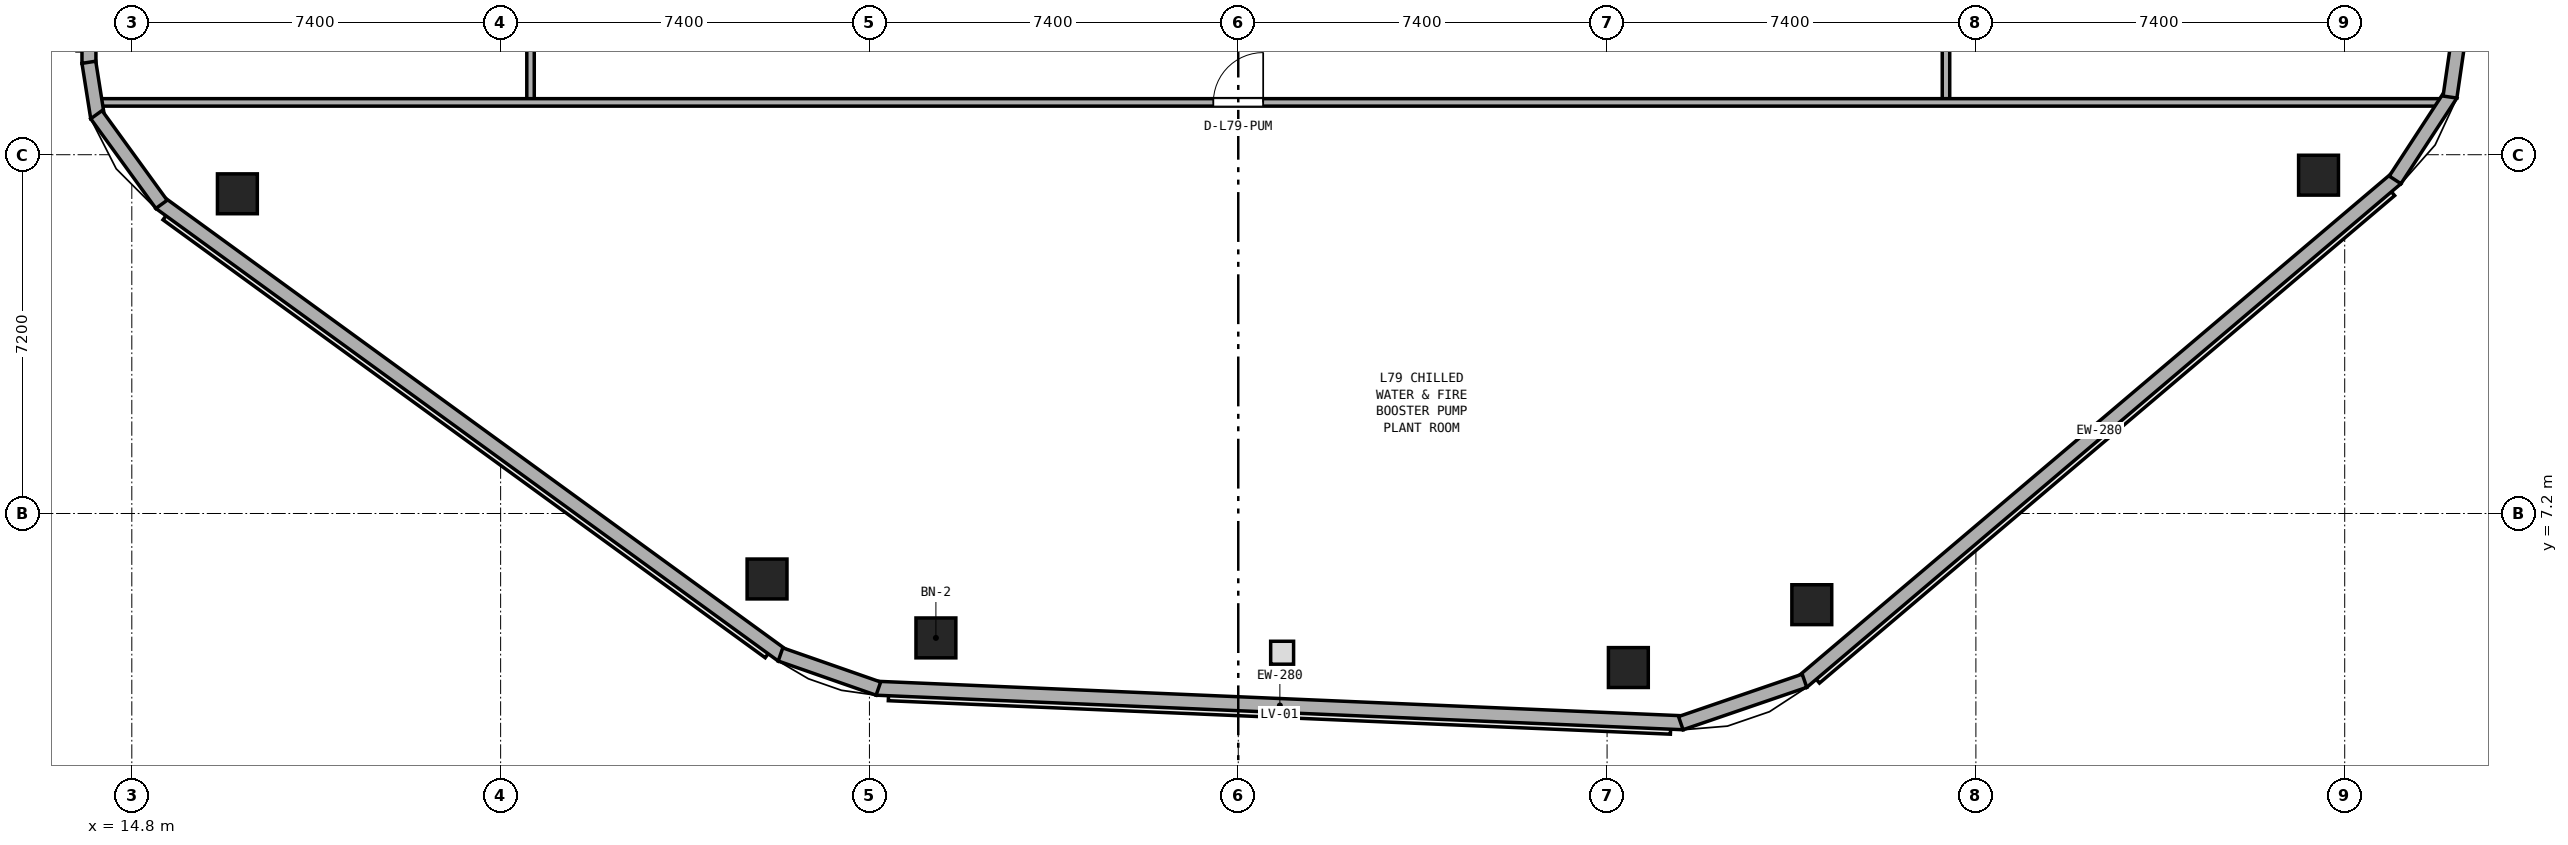
"""IFC4 building model, lengths in metres.
Left out: names, types, materials, properties, quantities, classifications, styles, units other than length and angle.
Written with IfcOpenShell. Run it as: python <this file> out.ifc"""

import sys

from ifc_helpers import new_model, si_unit, direction, frame, frame_2d, origin, origin_2d, place, context, subcontext, project, spatial, rectangle, extrude, element, fill, save


model = new_model("IFC4")
c1 = context("Model", 3, precision=1e-05, world=origin(), true_north=direction((0.0, 1.0)))
c2 = subcontext(c1, "Body", "Model", "MODEL_VIEW")
j1 = project(units=[si_unit("LENGTHUNIT", "METRE"), si_unit("PLANEANGLEUNIT", "RADIAN")], contexts=[c1])
p1 = place(None, origin())
s1 = spatial("IfcSite", under=j1, at=p1, CompositionType="ELEMENT")
p2 = place(p1, origin())
s2 = spatial("IfcBuilding", under=s1, at=p2, CompositionType="ELEMENT")
p3 = place(p2, frame((0.0, 0.0, 308.6)))
s3 = spatial("IfcBuildingStorey", under=s2, at=p3, CompositionType="ELEMENT", Elevation=308.6)
for number, where, z_axis, x_axis in (
    (1, (30.934, 4.703, 0.0), (0.0, 0.0, 1.0), (1.0, 0.0, 0.0)),
    (2, (44.827, 4.108, 0.0), (0.0, 0.0, 1.0), (1.0, 0.0, 0.0)),
    (3, (48.508, 5.37, 0.0), (0.0, 0.0, 1.0), (1.0, 0.0, 0.0)),
    (4, (58.675, 13.989, 0.0), (0.0, 0.0, 1.0), (1.0, 0.0, 0.0)),
    (5, (16.918, 13.616, 0.0), (0.0, 0.0, 1.0), (1.0, 0.0, 0.0)),
    (6, (27.545, 5.886, 0.0), (0.0, 0.0, 1.0), (1.0, 0.0, 0.0)),
):
    element("IfcColumn", number, at=place(p3, frame(where, z_axis=z_axis, x_axis=x_axis)), inside=s3, PredefinedType="COLUMN", context=c2, shape_type="SweptSolid", body=[
        extrude(rectangle(XDim=0.8, YDim=0.8, at=origin_2d()), origin(), (0.0, 0.0, 1.0), 4.8),
    ])
p4 = place(p3, frame((51.2, 15.45, 0.0), z_axis=(0.0, 0.0, 1.0), x_axis=(0.0, 1.0, 0.0)))
e7 = element("IfcWall", 7, at=p4, inside=s3, PredefinedType="PARTITIONING", context=c2, shape_type="SweptSolid", body=[
    extrude(rectangle(XDim=19.5, YDim=0.15, at=frame_2d((9.75, 0.0))), origin(), (0.0, 0.0, 1.0), 4.52),
])
p5 = place(p4, frame((9.15, 0.0, 0.0)))
e8 = element("IfcOpeningElement", 8, at=p5, cuts=e7, PredefinedType="OPENING", context=c2, shape_type="SweptSolid", body=[
    extrude(rectangle(XDim=1.2, YDim=2.15, at=frame_2d((0.6, 1.075))), frame((0.0, 0.085, 0.0), z_axis=(0.0, -1.0, 0.0), x_axis=(1.0, 0.0, 0.0)), (0.0, 0.0, 1.0), 0.17),
])
p6 = place(p3, frame((22.8, 15.45, 0.0), z_axis=(0.0, 0.0, 1.0), x_axis=(0.0, 1.0, 0.0)))
e9 = element("IfcWall", 9, at=p6, inside=s3, PredefinedType="PARTITIONING", context=c2, shape_type="SweptSolid", body=[
    extrude(rectangle(XDim=19.5, YDim=0.15, at=frame_2d((9.75, 0.0))), origin(), (0.0, 0.0, 1.0), 4.52),
])
p7 = place(p6, frame((9.25, 0.0, 0.0)))
e10 = element("IfcOpeningElement", 10, at=p7, cuts=e9, PredefinedType="OPENING", context=c2, shape_type="SweptSolid", body=[
    extrude(rectangle(XDim=1.0, YDim=2.04, at=frame_2d((0.5, 1.02))), frame((0.0, 0.085, 0.0), z_axis=(0.0, -1.0, 0.0), x_axis=(1.0, 0.0, 0.0)), (0.0, 0.0, 1.0), 0.17),
])
p8 = place(p3, frame((14.129, 15.45, 0.0), z_axis=(0.0, 0.0, 1.0), x_axis=(1.0, 0.0, 0.0)))
e11 = element("IfcWall", 11, at=p8, inside=s3, PredefinedType="PARTITIONING", context=c2, shape_type="SweptSolid", body=[
    extrude(rectangle(XDim=47.076, YDim=0.15, at=frame_2d((23.538, 0.0))), origin(), (0.0, 0.0, 1.0), 2.12),
])
p9 = place(p8, frame((22.371, 0.0, 0.0)))
e12 = element("IfcOpeningElement", 12, at=p9, cuts=e11, PredefinedType="OPENING", context=c2, shape_type="SweptSolid", body=[
    extrude(rectangle(XDim=1.0, YDim=2.04, at=frame_2d((0.5, 1.02))), frame((0.0, 0.085, 0.0), z_axis=(0.0, -1.0, 0.0), x_axis=(1.0, 0.0, 0.0)), (0.0, 0.0, 1.0), 0.17),
])
p10 = place(p3, frame((29.739, 3.693, 0.0), z_axis=(0.0, 0.0, 1.0), x_axis=(0.99908501205, -0.04276843108, 0.0)))
e13 = element("IfcWall", 13, at=p10, inside=s3, PredefinedType="STANDARD", context=c2, shape_type="SweptSolid", body=[
    extrude(rectangle(XDim=16.206, YDim=0.28, at=frame_2d((8.103, 0.0))), origin(), (0.0, 0.0, 1.0), 4.52),
])
p11 = place(p3, frame((48.316, 3.818, 0.0), z_axis=(0.0, 0.0, 1.0), x_axis=(0.762789291165, 0.646647119598, 0.0)))
e14 = element("IfcWall", 14, at=p11, inside=s3, PredefinedType="STANDARD", context=c2, shape_type="SweptSolid", body=[
    extrude(rectangle(XDim=15.629, YDim=0.28, at=frame_2d((7.814, 0.0))), origin(), (0.0, 0.0, 1.0), 4.52),
])
p12 = place(p3, frame((13.94, 33.386, 0.0), z_axis=(0.0, 0.0, 1.0), x_axis=(0.0, -1.0, 0.0)))
e15 = element("IfcWall", 15, at=p12, inside=s3, PredefinedType="STANDARD", context=c2, shape_type="SweptSolid", body=[
    extrude(rectangle(XDim=17.153, YDim=0.28, at=frame_2d((8.576, 0.0))), origin(), (0.0, 0.0, 1.0), 4.52),
])
p13 = place(p3, frame((15.365, 13.435, 0.0), z_axis=(0.0, 0.0, 1.0), x_axis=(0.8087025807, -0.588217762372, 0.0)))
e16 = element("IfcWall", 16, at=p13, inside=s3, PredefinedType="STANDARD", context=c2, shape_type="SweptSolid", body=[
    extrude(rectangle(XDim=15.441, YDim=0.28, at=frame_2d((7.721, 0.0))), origin(), (0.0, 0.0, 1.0), 4.52),
])
p14 = place(p3, frame((45.879, 2.993, 0.0), z_axis=(0.0, 0.0, 1.0), x_axis=(0.945959811021, 0.324283881704, 0.0)))
e17 = element("IfcWall", 17, at=p14, inside=s3, PredefinedType="STANDARD", context=c2, shape_type="SweptSolid", body=[
    extrude(rectangle(XDim=2.624, YDim=0.28, at=frame_2d((1.312, 0.0))), origin(), (0.0, 0.0, 1.0), 4.52),
])
p15 = place(p3, frame((60.211, 13.894, 0.0), z_axis=(0.0, 0.0, 1.0), x_axis=(0.546663025999, 0.837352695109, 0.0)))
e18 = element("IfcWall", 18, at=p15, inside=s3, PredefinedType="STANDARD", context=c2, shape_type="SweptSolid", body=[
    extrude(rectangle(XDim=2.053, YDim=0.28, at=frame_2d((1.027, 0.0))), origin(), (0.0, 0.0, 1.0), 4.52),
])
p16 = place(p3, frame((61.312, 15.557, 0.0), z_axis=(0.0, 0.0, 1.0), x_axis=(0.144023647734, 0.989574246276, 0.0)))
e19 = element("IfcWall", 19, at=p16, inside=s3, PredefinedType="STANDARD", context=c2, shape_type="SweptSolid", body=[
    extrude(rectangle(XDim=1.037, YDim=0.28, at=frame_2d((0.519, 0.0))), origin(), (0.0, 0.0, 1.0), 4.52),
])
p17 = place(p3, frame((13.938, 16.255, 0.0), z_axis=(0.0, 0.0, 1.0), x_axis=(0.156374642871, -0.987697813639, 0.0)))
e20 = element("IfcWall", 20, at=p17, inside=s3, PredefinedType="STANDARD", context=c2, shape_type="SweptSolid", body=[
    extrude(rectangle(XDim=1.126, YDim=0.28, at=frame_2d((0.563, 0.0))), origin(), (0.0, 0.0, 1.0), 4.52),
])
p18 = place(p3, frame((14.089, 15.203, 0.0), z_axis=(0.0, 0.0, 1.0), x_axis=(0.587472992332, -0.809243772469, 0.0)))
e21 = element("IfcWall", 21, at=p18, inside=s3, PredefinedType="STANDARD", context=c2, shape_type="SweptSolid", body=[
    extrude(rectangle(XDim=2.224, YDim=0.28, at=frame_2d((1.112, 0.0))), origin(), (0.0, 0.0, 1.0), 4.52),
])
p19 = place(p3, frame((27.816, 4.371, 0.0), z_axis=(0.0, 0.0, 1.0), x_axis=(0.944152627724, -0.329508445359, 0.0)))
e22 = element("IfcWall", 22, at=p19, inside=s3, PredefinedType="STANDARD", context=c2, shape_type="SweptSolid", body=[
    extrude(rectangle(XDim=2.08, YDim=0.28, at=frame_2d((1.04, 0.0))), origin(), (0.0, 0.0, 1.0), 4.52),
])
p20 = place(p9, origin())
e23 = element("IfcDoor", 23, at=p20, inside=s3, OperationType="SINGLE_SWING_RIGHT", PredefinedType="DOOR", context=c2, shape_type="SweptSolid", body=[
    extrude(rectangle(XDim=1.0, YDim=2.04, at=frame_2d((0.5, 1.02))), frame((0.0, 0.025, 0.0), z_axis=(0.0, -1.0, 0.0), x_axis=(1.0, 0.0, 0.0)), (0.0, 0.0, 1.0), 0.05),
])
fill(e12, e23)
save(model, sys.argv[1])
